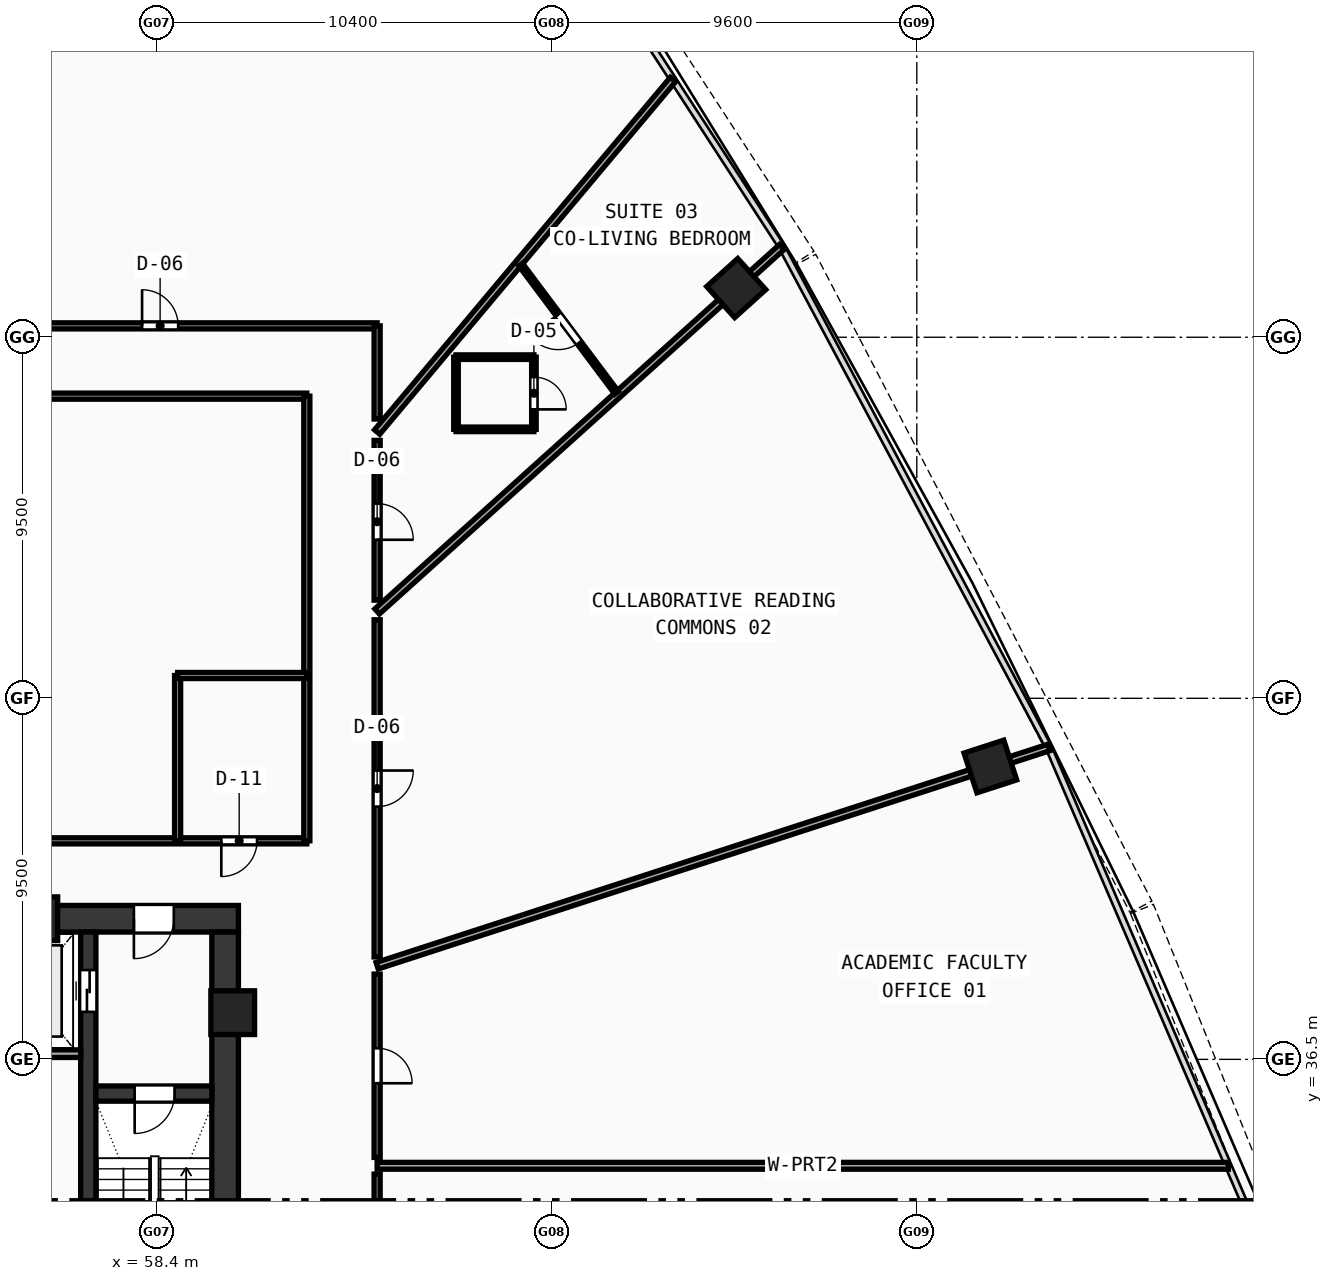
"""IFC4 building model, lengths in metres.
Left out: names, types, materials, properties, quantities, classifications, styles, units other than length and angle.
Written with IfcOpenShell. Run it as: python <this file> out.ifc"""

import sys

from ifc_helpers import new_model, si_unit, direction, frame, frame_2d, origin, origin_with_axes, origin_2d, place, context, subcontext, project, spatial, rectangle, hollow_rectangle, extrude, source, transform, mapped, element, fill, save


model = new_model("IFC4")
c1 = context("Model", 3, precision=1e-05, world=origin(), true_north=direction((0.0, 1.0)))
c2 = subcontext(c1, "Body", "Model", "MODEL_VIEW")
j1 = project(units=[si_unit("LENGTHUNIT", "METRE"), si_unit("PLANEANGLEUNIT", "RADIAN")], contexts=[c1])
p1 = place(None, origin())
s1 = spatial("IfcSite", under=j1, at=p1, CompositionType="ELEMENT")
p2 = place(p1, origin())
s2 = spatial("IfcBuilding", under=s1, at=p2, CompositionType="ELEMENT")
p3 = place(p2, frame((0.0, 0.0, 41.29)))
s3 = spatial("IfcBuildingStorey", under=s2, at=p3, CompositionType="ELEMENT", Elevation=41.29)
p4 = place(p3, frame((49.2, 40.2, 0.0), z_axis=(0.0, 0.0, 1.0), x_axis=(1.0, 0.0, 0.0)))
e1 = element("IfcWall", 1, at=p4, inside=s3, PredefinedType="SHEAR", context=c2, shape_type="SweptSolid", body=[
    extrude(rectangle(XDim=11.35, YDim=0.7, at=frame_2d((5.675, 0.0))), origin(), (0.0, 0.0, 1.0), 3.37),
])
p5 = place(p4, frame((8.6, 0.0, 0.0)))
e2 = element("IfcOpeningElement", 2, at=p5, cuts=e1, PredefinedType="OPENING", context=c2, shape_type="SweptSolid", body=[
    extrude(rectangle(XDim=1.05, YDim=2.1, at=frame_2d((0.525, 1.05))), frame((0.0, 0.36, 0.0), z_axis=(0.0, -1.0, 0.0), x_axis=(1.0, 0.0, 0.0)), (0.0, 0.0, 1.0), 0.72),
])
p6 = place(p3, frame((60.2, 27.85, 0.0), z_axis=(0.0, 0.0, 1.0), x_axis=(0.0, 1.0, 0.0)))
e3 = element("IfcWall", 3, at=p6, inside=s3, PredefinedType="SHEAR", context=c2, shape_type="SweptSolid", body=[
    extrude(rectangle(XDim=12.0, YDim=0.7, at=frame_2d((6.0, 0.0))), origin(), (0.0, 0.0, 1.0), 3.37),
])
p7 = place(p3, frame((56.6, 27.85, 0.0), z_axis=(0.0, 0.0, 1.0), x_axis=(0.0, 1.0, 0.0)))
e4 = element("IfcWall", 4, at=p7, inside=s3, PredefinedType="SHEAR", context=c2, shape_type="SweptSolid", body=[
    extrude(rectangle(XDim=12.0, YDim=0.4, at=frame_2d((6.0, 0.0))), origin(), (0.0, 0.0, 1.0), 3.37),
])
p8 = place(p7, frame((9.9, 0.0, 0.0)))
e5 = element("IfcOpeningElement", 5, at=p8, cuts=e4, PredefinedType="OPENING", context=c2, shape_type="SweptSolid", body=[
    extrude(rectangle(XDim=1.1, YDim=2.1, at=frame_2d((0.55, 1.05))), frame((0.0, 0.21, 0.0), z_axis=(0.0, -1.0, 0.0), x_axis=(1.0, 0.0, 0.0)), (0.0, 0.0, 1.0), 0.42),
])
p9 = place(p3, frame((56.8, 35.6, 0.0), z_axis=(0.0, 0.0, 1.0), x_axis=(1.0, 0.0, 0.0)))
e6 = element("IfcWall", 6, at=p9, inside=s3, PredefinedType="SHEAR", context=c2, shape_type="SweptSolid", body=[
    extrude(rectangle(XDim=3.05, YDim=0.4, at=frame_2d((1.525, 0.0))), origin(), (0.0, 0.0, 1.0), 3.37),
])
p10 = place(p9, frame((1.02, 0.0, 0.0)))
e7 = element("IfcOpeningElement", 7, at=p10, cuts=e6, PredefinedType="OPENING", context=c2, shape_type="SweptSolid", body=[
    extrude(rectangle(XDim=1.05, YDim=2.1, at=frame_2d((0.525, 1.05))), frame((0.0, 0.21, 0.0), z_axis=(0.0, -1.0, 0.0), x_axis=(1.0, 0.0, 0.0)), (0.0, 0.0, 1.0), 0.42),
])
m1 = source(origin(), c2, "Body", "SweptSolid", [
    extrude(hollow_rectangle(XDim=1.15, YDim=1.15, WallThickness=0.048, at=origin_2d()), origin(), (0.0, 0.0, 1.0), 3.63),
])
for number, where, z_axis, x_axis in (
    (8, (60.4, 37.729, -0.26), (0.0, 0.0, 1.0), (1.0, 0.0, 0.0)),
    (9, (55.219, 40.2, -0.26), (0.0, 0.0, 1.0), (1.0, 0.0, 0.0)),
):
    element("IfcColumn", number, at=place(p3, frame(where, z_axis=z_axis, x_axis=x_axis)), inside=s3, PredefinedType="COLUMN", context=c2, shape_type="MappedRepresentation", body=[
        mapped(m1, transform((0.0, 0.0, 0.0), scale=1.0)),
    ])
m2 = source(origin(), c2, "Body", "SweptSolid", [
    extrude(hollow_rectangle(XDim=1.1, YDim=1.1, WallThickness=0.045, at=origin_2d()), origin(), (0.0, 0.0, 1.0), 3.63),
])
for number, where, z_axis, x_axis in (
    (10, (80.335, 44.206, -0.26), (0.0, 0.0, 1.0), (-0.309, 0.951, 0.0)),
    (11, (73.649, 56.794, -0.26), (0.0, 0.0, 1.0), (-0.669, 0.743, 0.0)),
):
    element("IfcColumn", number, at=place(p3, frame(where, z_axis=z_axis, x_axis=x_axis)), inside=s3, PredefinedType="COLUMN", context=c2, shape_type="MappedRepresentation", body=[
        mapped(m2, transform((0.0, 0.0, 0.0), scale=1.0)),
    ])
p11 = place(p3, frame((53.68, 36.65, 0.0), z_axis=(0.0, 0.0, 1.0), x_axis=(1.0, 0.0, 0.0)))
e12 = element("IfcWall", 12, at=p11, inside=s3, PredefinedType="SOLIDWALL", context=c2, shape_type="SweptSolid", body=[
    extrude(rectangle(XDim=2.72, YDim=0.2, at=frame_2d((1.36, 0.0))), origin(), (0.0, 0.0, 1.0), 3.37),
])
p12 = place(p3, frame((45.92, 42.25, 0.0), z_axis=(0.0, 0.0, 1.0), x_axis=(1.0, 0.0, 0.0)))
e13 = element("IfcWall", 13, at=p12, inside=s3, PredefinedType="PARTITIONING", context=c2, shape_type="SweptSolid", body=[
    extrude(rectangle(XDim=16.43, YDim=0.16, at=frame_2d((8.215, 0.0))), origin(), (0.0, 0.0, 1.0), 2.67),
])
p13 = place(p12, frame((2.1, 0.0, 0.0)))
e14 = element("IfcOpeningElement", 14, at=p13, cuts=e13, PredefinedType="OPENING", context=c2, shape_type="SweptSolid", body=[
    extrude(rectangle(XDim=0.92, YDim=2.1, at=frame_2d((0.46, 1.05))), frame((0.0, 0.09, 0.0), z_axis=(0.0, -1.0, 0.0), x_axis=(1.0, 0.0, 0.0)), (0.0, 0.0, 1.0), 0.18),
])
p14 = place(p12, frame((14.18, 0.0, 0.0)))
e15 = element("IfcOpeningElement", 15, at=p14, cuts=e13, PredefinedType="OPENING", context=c2, shape_type="SweptSolid", body=[
    extrude(rectangle(XDim=0.94, YDim=2.1, at=frame_2d((0.47, 1.05))), frame((0.0, 0.09, 0.0), z_axis=(0.0, -1.0, 0.0), x_axis=(1.0, 0.0, 0.0)), (0.0, 0.0, 1.0), 0.18),
])
p15 = place(p3, frame((45.92, 53.95, 0.0), z_axis=(0.0, 0.0, 1.0), x_axis=(1.0, 0.0, 0.0)))
e16 = element("IfcWall", 16, at=p15, inside=s3, PredefinedType="PARTITIONING", context=c2, shape_type="SweptSolid", body=[
    extrude(rectangle(XDim=16.43, YDim=0.16, at=frame_2d((8.215, 0.0))), origin(), (0.0, 0.0, 1.0), 2.67),
])
p16 = place(p3, frame((62.35, 42.25, 0.0), z_axis=(0.0, 0.0, 1.0), x_axis=(0.0, 1.0, 0.0)))
e17 = element("IfcWall", 17, at=p16, inside=s3, PredefinedType="PARTITIONING", context=c2, shape_type="SweptSolid", body=[
    extrude(rectangle(XDim=11.7, YDim=0.16, at=frame_2d((5.85, 0.0))), origin(), (0.0, 0.0, 1.0), 2.67),
])
p17 = place(p3, frame((58.95, 42.25, 0.0), z_axis=(0.0, 0.0, 1.0), x_axis=(0.0, 1.0, 0.0)))
e18 = element("IfcWall", 18, at=p17, inside=s3, PredefinedType="PARTITIONING", context=c2, shape_type="SweptSolid", body=[
    extrude(rectangle(XDim=4.35, YDim=0.16, at=frame_2d((2.175, 0.0))), origin(), (0.0, 0.0, 1.0), 2.67),
])
p18 = place(p3, frame((58.95, 46.6, 0.0), z_axis=(0.0, 0.0, 1.0), x_axis=(1.0, 0.0, 0.0)))
e19 = element("IfcWall", 19, at=p18, inside=s3, PredefinedType="PARTITIONING", context=c2, shape_type="SweptSolid", body=[
    extrude(rectangle(XDim=3.4, YDim=0.16, at=frame_2d((1.7, 0.0))), origin(), (0.0, 0.0, 1.0), 2.67),
])
p19 = place(p3, frame((64.2, 33.7, 0.0), z_axis=(0.0, 0.0, 1.0), x_axis=(1.0, 0.0, 0.0)))
e20 = element("IfcWall", 20, at=p19, inside=s3, PredefinedType="PARTITIONING", context=c2, shape_type="SweptSolid", body=[
    extrude(rectangle(XDim=22.398, YDim=0.18, at=frame_2d((11.199, 0.0))), origin(), (0.0, 0.0, 1.0), 2.67),
])
p20 = place(p3, frame((64.2, 38.964, 0.0), z_axis=(0.0, 0.0, 1.0), x_axis=(0.951055212532, 0.309021006915, 0.0)))
e21 = element("IfcWall", 21, at=p20, inside=s3, PredefinedType="PARTITIONING", context=c2, shape_type="SweptSolid", body=[
    extrude(rectangle(XDim=18.581, YDim=0.18, at=frame_2d((9.291, 0.0))), origin(), (0.0, 0.0, 1.0), 2.67),
])
p21 = place(p3, frame((64.2, 48.287, 0.0), z_axis=(0.0, 0.0, 1.0), x_axis=(0.743156867614, 0.669117231969, 0.0)))
e22 = element("IfcWall", 22, at=p21, inside=s3, PredefinedType="PARTITIONING", context=c2, shape_type="SweptSolid", body=[
    extrude(rectangle(XDim=14.327, YDim=0.18, at=frame_2d((7.164, 0.0))), origin(), (0.0, 0.0, 1.0), 2.67),
])
p22 = place(p3, frame((64.2, 53.006, 0.0), z_axis=(0.0, 0.0, 1.0), x_axis=(0.642786334534, 0.766045513098, 0.0)))
e23 = element("IfcWall", 23, at=p22, inside=s3, PredefinedType="PARTITIONING", context=c2, shape_type="SweptSolid", body=[
    extrude(rectangle(XDim=12.11, YDim=0.18, at=frame_2d((6.055, 0.0))), origin(), (0.0, 0.0, 1.0), 2.67),
])
p23 = place(p3, frame((52.391, 55.8, 0.0), z_axis=(0.0, 0.0, 1.0), x_axis=(1.0, 0.0, 0.0)))
e24 = element("IfcWall", 24, at=p23, inside=s3, PredefinedType="PARTITIONING", context=c2, shape_type="SweptSolid", body=[
    extrude(rectangle(XDim=11.809, YDim=0.16, at=frame_2d((5.904, 0.0))), origin(), (0.0, 0.0, 1.0), 2.67),
])
p24 = place(p23, frame((5.624, 0.0, 0.0)))
e25 = element("IfcOpeningElement", 25, at=p24, cuts=e24, PredefinedType="OPENING", context=c2, shape_type="SweptSolid", body=[
    extrude(rectangle(XDim=0.95, YDim=2.1, at=frame_2d((0.475, 1.05))), frame((0.0, 0.09, 0.0), z_axis=(0.0, -1.0, 0.0), x_axis=(1.0, 0.0, 0.0)), (0.0, 0.0, 1.0), 0.18),
])
p25 = place(p3, frame((64.2, 55.8, 0.0), z_axis=(0.0, 0.0, 1.0), x_axis=(0.0, -1.0, 0.0)))
e26 = element("IfcWall", 26, at=p25, inside=s3, PredefinedType="PARTITIONING", context=c2, shape_type="SweptSolid", body=[
    extrude(rectangle(XDim=2.451, YDim=0.16, at=frame_2d((1.226, 0.0))), origin(), (0.0, 0.0, 1.0), 2.97),
])
p26 = place(p3, frame((64.2, 52.787, 0.0), z_axis=(0.0, 0.0, 1.0), x_axis=(0.0, -1.0, 0.0)))
e27 = element("IfcWall", 27, at=p26, inside=s3, PredefinedType="PARTITIONING", context=c2, shape_type="SweptSolid", body=[
    extrude(rectangle(XDim=4.204, YDim=0.16, at=frame_2d((2.102, 0.0))), origin(), (0.0, 0.0, 1.0), 3.37),
])
p27 = place(p26, frame((1.665, 0.0, 0.0)))
e28 = element("IfcOpeningElement", 28, at=p27, cuts=e27, PredefinedType="OPENING", context=c2, shape_type="SweptSolid", body=[
    extrude(rectangle(XDim=0.95, YDim=2.1, at=frame_2d((0.475, 1.05))), frame((0.0, 0.09, 0.0), z_axis=(0.0, -1.0, 0.0), x_axis=(1.0, 0.0, 0.0)), (0.0, 0.0, 1.0), 0.18),
])
p28 = place(p3, frame((64.2, 48.067, 0.0), z_axis=(0.0, 0.0, 1.0), x_axis=(0.0, -1.0, 0.0)))
e29 = element("IfcWall", 29, at=p28, inside=s3, PredefinedType="PARTITIONING", context=c2, shape_type="SweptSolid", body=[
    extrude(rectangle(XDim=8.872, YDim=0.16, at=frame_2d((4.436, 0.0))), origin(), (0.0, 0.0, 1.0), 2.67),
])
p29 = place(p28, frame((3.967, 0.0, 0.0)))
e30 = element("IfcOpeningElement", 30, at=p29, cuts=e29, PredefinedType="OPENING", context=c2, shape_type="SweptSolid", body=[
    extrude(rectangle(XDim=0.95, YDim=2.1, at=frame_2d((0.475, 1.05))), frame((0.0, 0.09, 0.0), z_axis=(0.0, -1.0, 0.0), x_axis=(1.0, 0.0, 0.0)), (0.0, 0.0, 1.0), 0.18),
])
p30 = place(p3, frame((64.2, 38.744, 0.0), z_axis=(0.0, 0.0, 1.0), x_axis=(0.0, -1.0, 0.0)))
e31 = element("IfcWall", 31, at=p30, inside=s3, PredefinedType="PARTITIONING", context=c2, shape_type="SweptSolid", body=[
    extrude(rectangle(XDim=4.824, YDim=0.16, at=frame_2d((2.412, 0.0))), origin(), (0.0, 0.0, 1.0), 3.37),
])
p31 = place(p30, frame((1.952, 0.0, 0.0)))
e32 = element("IfcOpeningElement", 32, at=p31, cuts=e31, PredefinedType="OPENING", context=c2, shape_type="SweptSolid", body=[
    extrude(rectangle(XDim=0.92, YDim=2.1, at=frame_2d((0.46, 1.05))), frame((0.0, 0.09, 0.0), z_axis=(0.0, -1.0, 0.0), x_axis=(1.0, 0.0, 0.0)), (0.0, 0.0, 1.0), 0.18),
])
p32 = place(p3, frame((64.2, 33.48, 0.0), z_axis=(0.0, 0.0, 1.0), x_axis=(0.0, -1.0, 0.0)))
e33 = element("IfcWall", 33, at=p32, inside=s3, PredefinedType="PARTITIONING", context=c2, shape_type="SweptSolid", body=[
    extrude(rectangle(XDim=2.417, YDim=0.16, at=frame_2d((1.208, 0.0))), origin(), (0.0, 0.0, 1.0), 3.37),
])
p33 = place(p32, frame((0.733, 0.0, 0.0)))
e34 = element("IfcOpeningElement", 34, at=p33, cuts=e33, PredefinedType="OPENING", context=c2, shape_type="SweptSolid", body=[
    extrude(rectangle(XDim=0.95, YDim=2.1, at=frame_2d((0.475, 1.05))), frame((0.0, 0.09, 0.0), z_axis=(0.0, -1.0, 0.0), x_axis=(1.0, 0.0, 0.0)), (0.0, 0.0, 1.0), 0.18),
])
p34 = place(p3, frame((66.275, 53.077, 0.0), z_axis=(0.0, 0.0, 1.0), x_axis=(1.0, 0.0, 0.0)))
e35 = element("IfcWall", 35, at=p34, inside=s3, PredefinedType="PARTITIONING", context=c2, shape_type="SweptSolid", body=[
    extrude(rectangle(XDim=2.05, YDim=0.12, at=frame_2d((1.025, 0.0))), origin(), (0.0, 0.0, 1.0), 2.97),
])
p35 = place(p3, frame((68.325, 53.077, 0.0), z_axis=(0.0, 0.0, 1.0), x_axis=(0.0, 1.0, 0.0)))
e36 = element("IfcWall", 36, at=p35, inside=s3, PredefinedType="PARTITIONING", context=c2, shape_type="SweptSolid", body=[
    extrude(rectangle(XDim=1.9, YDim=0.12, at=frame_2d((0.95, 0.0))), origin(), (0.0, 0.0, 1.0), 3.37),
])
p36 = place(p35, frame((0.525, 0.0, 0.0)))
e37 = element("IfcOpeningElement", 37, at=p36, cuts=e36, PredefinedType="OPENING", context=c2, shape_type="SweptSolid", body=[
    extrude(rectangle(XDim=0.85, YDim=2.1, at=frame_2d((0.425, 1.05))), frame((0.0, 0.07, 0.0), z_axis=(0.0, -1.0, 0.0), x_axis=(1.0, 0.0, 0.0)), (0.0, 0.0, 1.0), 0.14),
])
p37 = place(p3, frame((68.325, 54.977, 0.0), z_axis=(0.0, 0.0, 1.0), x_axis=(-1.0, 0.0, 0.0)))
e38 = element("IfcWall", 38, at=p37, inside=s3, PredefinedType="PARTITIONING", context=c2, shape_type="SweptSolid", body=[
    extrude(rectangle(XDim=2.05, YDim=0.12, at=frame_2d((1.025, 0.0))), origin(), (0.0, 0.0, 1.0), 3.37),
])
p38 = place(p3, frame((66.275, 54.977, 0.0), z_axis=(0.0, 0.0, 1.0), x_axis=(0.0, -1.0, 0.0)))
e39 = element("IfcWall", 39, at=p38, inside=s3, PredefinedType="PARTITIONING", context=c2, shape_type="SweptSolid", body=[
    extrude(rectangle(XDim=1.9, YDim=0.12, at=frame_2d((0.95, 0.0))), origin(), (0.0, 0.0, 1.0), 2.97),
])
p39 = place(p3, frame((70.501, 54.04, 0.0), z_axis=(0.0, 0.0, 1.0), x_axis=(-0.599443526822, 0.800417052636, 0.0)))
e40 = element("IfcWall", 40, at=p39, inside=s3, PredefinedType="PARTITIONING", context=c2, shape_type="SweptSolid", body=[
    extrude(rectangle(XDim=4.213, YDim=0.12, at=frame_2d((2.106, 0.0))), origin(), (0.0, 0.0, 1.0), 2.67),
])
p40 = place(p39, frame((1.646, 0.0, 0.0)))
e41 = element("IfcOpeningElement", 41, at=p40, cuts=e40, PredefinedType="OPENING", context=c2, shape_type="SweptSolid", body=[
    extrude(rectangle(XDim=0.92, YDim=2.1, at=frame_2d((0.46, 1.05))), frame((0.0, 0.07, 0.0), z_axis=(0.0, -1.0, 0.0), x_axis=(1.0, 0.0, 0.0)), (0.0, 0.0, 1.0), 0.14),
])
m3 = source(origin(), c2, "Body", "SweptSolid", [
    extrude(rectangle(XDim=1.05, YDim=2.1, at=frame_2d((0.525, 1.05))), frame((0.0, 0.025, 0.0), z_axis=(0.0, -1.0, 0.0), x_axis=(1.0, 0.0, 0.0)), (0.0, 0.0, 1.0), 0.05),
])
p41 = place(p10, frame((1.05, 0.0, 0.0), z_axis=(0.0, 0.0, 1.0), x_axis=(-1.0, 0.0, 0.0)))
e42 = element("IfcDoor", 42, at=p41, inside=s3, OperationType="SINGLE_SWING_RIGHT", PredefinedType="DOOR", context=c2, shape_type="MappedRepresentation", body=[
    mapped(m3, transform((0.0, 0.0, 0.0), scale=1.0)),
])
fill(e7, e42)
p42 = place(p5, frame((1.05, 0.0, 0.0), z_axis=(0.0, 0.0, 1.0), x_axis=(-1.0, 0.0, 0.0)))
e43 = element("IfcDoor", 43, at=p42, inside=s3, OperationType="SINGLE_SWING_RIGHT", PredefinedType="DOOR", context=c2, shape_type="MappedRepresentation", body=[
    mapped(m3, transform((0.0, 0.0, 0.0), scale=1.0)),
])
fill(e2, e43)
m4 = source(origin(), c2, "Body", "SweptSolid", [
    extrude(rectangle(XDim=1.1, YDim=2.1, at=frame_2d((0.55, 1.05))), frame((0.0, 0.025, 0.0), z_axis=(0.0, -1.0, 0.0), x_axis=(1.0, 0.0, 0.0)), (0.0, 0.0, 1.0), 0.05),
])
p43 = place(p8, origin_with_axes())
e44 = element("IfcDoor", 44, at=p43, inside=s3, OperationType="DOUBLE_DOOR_SLIDING", PredefinedType="DOOR", context=c2, shape_type="MappedRepresentation", body=[
    mapped(m4, transform((0.0, 0.0, 0.0), scale=1.0)),
])
fill(e5, e44)
m5 = source(origin(), c2, "Body", "SweptSolid", [
    extrude(rectangle(XDim=0.94, YDim=2.1, at=frame_2d((0.47, 1.05))), frame((0.0, 0.025, 0.0), z_axis=(0.0, -1.0, 0.0), x_axis=(1.0, 0.0, 0.0)), (0.0, 0.0, 1.0), 0.05),
])
p44 = place(p14, frame((0.94, 0.0, 0.0), z_axis=(0.0, 0.0, 1.0), x_axis=(-1.0, 0.0, 0.0)))
e45 = element("IfcDoor", 45, at=p44, inside=s3, OperationType="SINGLE_SWING_RIGHT", PredefinedType="DOOR", context=c2, shape_type="MappedRepresentation", body=[
    mapped(m5, transform((0.0, 0.0, 0.0), scale=1.0)),
])
fill(e15, e45)
m6 = source(origin(), c2, "Body", "SweptSolid", [
    extrude(rectangle(XDim=0.92, YDim=2.1, at=frame_2d((0.46, 1.05))), frame((0.0, 0.025, 0.0), z_axis=(0.0, -1.0, 0.0), x_axis=(1.0, 0.0, 0.0)), (0.0, 0.0, 1.0), 0.05),
])
p45 = place(p31, origin_with_axes())
e46 = element("IfcDoor", 46, at=p45, inside=s3, OperationType="SINGLE_SWING_RIGHT", PredefinedType="DOOR", context=c2, shape_type="MappedRepresentation", body=[
    mapped(m6, transform((0.0, 0.0, 0.0), scale=1.0)),
])
fill(e32, e46)
m7 = source(origin(), c2, "Body", "SweptSolid", [
    extrude(rectangle(XDim=0.95, YDim=2.1, at=frame_2d((0.475, 1.05))), frame((0.0, 0.025, 0.0), z_axis=(0.0, -1.0, 0.0), x_axis=(1.0, 0.0, 0.0)), (0.0, 0.0, 1.0), 0.05),
])
p46 = place(p29, origin_with_axes())
e47 = element("IfcDoor", 47, at=p46, inside=s3, OperationType="SINGLE_SWING_LEFT", PredefinedType="DOOR", context=c2, shape_type="MappedRepresentation", body=[
    mapped(m7, transform((0.0, 0.0, 0.0), scale=1.0)),
])
fill(e30, e47)
p47 = place(p27, origin_with_axes())
e48 = element("IfcDoor", 48, at=p47, inside=s3, OperationType="SINGLE_SWING_RIGHT", PredefinedType="DOOR", context=c2, shape_type="MappedRepresentation", body=[
    mapped(m7, transform((0.0, 0.0, 0.0), scale=1.0)),
])
fill(e28, e48)
m8 = source(origin(), c2, "Body", "SweptSolid", [
    extrude(rectangle(XDim=0.85, YDim=2.1, at=frame_2d((0.425, 1.05))), frame((0.0, 0.025, 0.0), z_axis=(0.0, -1.0, 0.0), x_axis=(1.0, 0.0, 0.0)), (0.0, 0.0, 1.0), 0.05),
])
p48 = place(p36, frame((0.85, 0.0, 0.0), z_axis=(0.0, 0.0, 1.0), x_axis=(-1.0, 0.0, 0.0)))
e49 = element("IfcDoor", 49, at=p48, inside=s3, OperationType="SINGLE_SWING_RIGHT", PredefinedType="DOOR", context=c2, shape_type="MappedRepresentation", body=[
    mapped(m8, transform((0.0, 0.0, 0.0), scale=1.0)),
])
fill(e37, e49)
p49 = place(p40, origin_with_axes())
e50 = element("IfcDoor", 50, at=p49, inside=s3, OperationType="SINGLE_SWING_RIGHT", PredefinedType="DOOR", context=c2, shape_type="MappedRepresentation", body=[
    mapped(m6, transform((0.0, 0.0, 0.0), scale=1.0)),
])
fill(e41, e50)
p50 = place(p24, origin_with_axes())
e51 = element("IfcDoor", 51, at=p50, inside=s3, OperationType="SINGLE_SWING_LEFT", PredefinedType="DOOR", context=c2, shape_type="MappedRepresentation", body=[
    mapped(m7, transform((0.0, 0.0, 0.0), scale=1.0)),
])
fill(e25, e51)
save(model, sys.argv[1])
